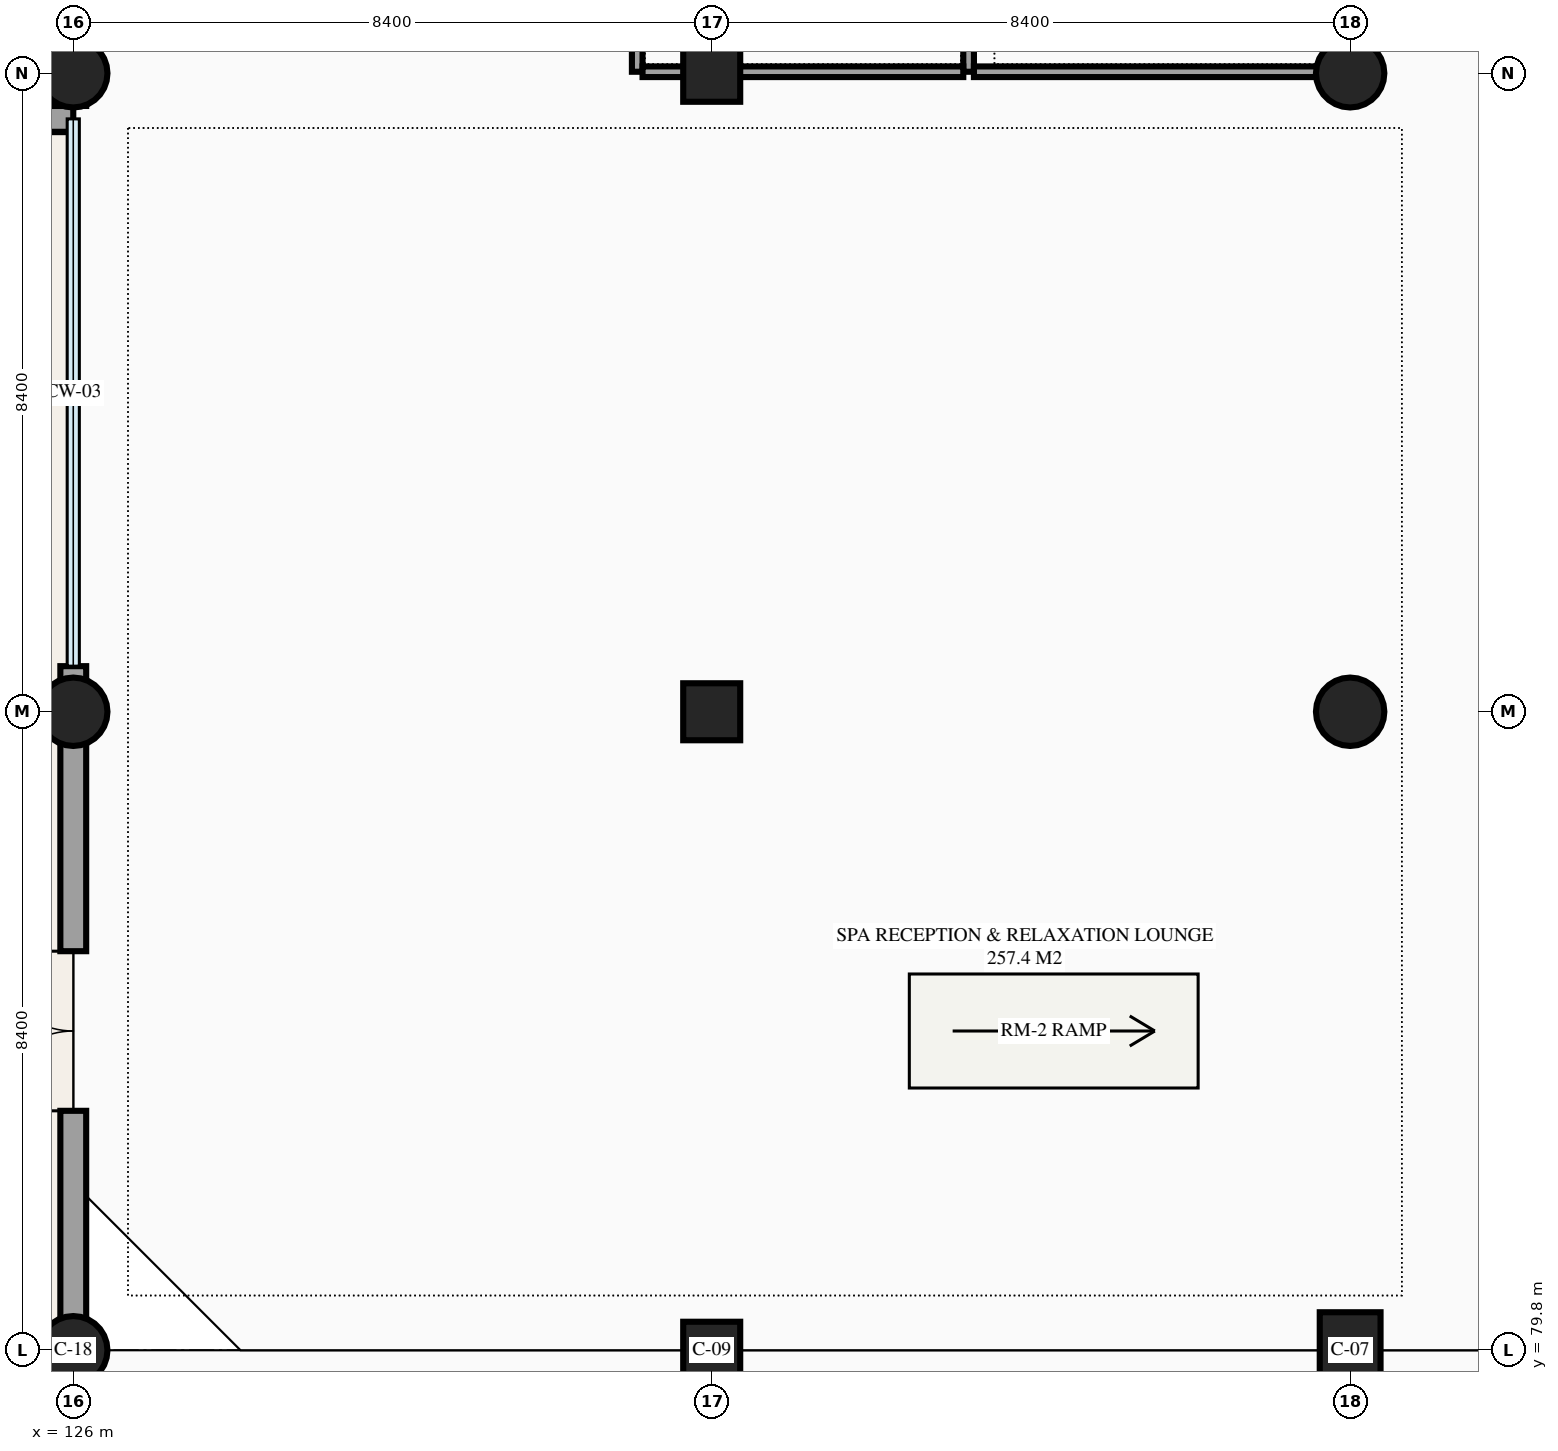
"""IFC4 building model, lengths in metres.
Left out: names, types, materials, properties, quantities, classifications, styles, units other than length and angle.
Written with IfcOpenShell. Run it as: python <this file> out.ifc"""

import sys

from ifc_helpers import new_model, si_unit, direction, frame, frame_2d, origin, origin_2d, place, context, subcontext, project, spatial, rectangle, circle, extrude, element, fill, save


model = new_model("IFC4")
c1 = context("Model", 3, precision=1e-05, world=origin(), true_north=direction((0.0, 1.0)))
c2 = subcontext(c1, "Body", "Model", "MODEL_VIEW")
j1 = project(units=[si_unit("LENGTHUNIT", "METRE"), si_unit("PLANEANGLEUNIT", "RADIAN")], contexts=[c1])
p1 = place(None, origin())
s1 = spatial("IfcSite", under=j1, at=p1, CompositionType="ELEMENT")
p2 = place(p1, origin())
s2 = spatial("IfcBuilding", under=s1, at=p2, CompositionType="ELEMENT")
p3 = place(p2, origin())
s3 = spatial("IfcBuildingStorey", under=s2, at=p3, CompositionType="ELEMENT", Elevation=0.0)
for number, where, z_axis, x_axis in (
    (1, (126.0, 79.8, 0.0), (0.0, 0.0, 1.0), (1.0, 0.0, 0.0)),
    (2, (126.0, 88.2, 0.0), (0.0, 0.0, 1.0), (1.0, 0.0, 0.0)),
    (3, (126.0, 96.6, 0.0), (0.0, 0.0, 1.0), (1.0, 0.0, 0.0)),
):
    element("IfcColumn", number, at=place(p3, frame(where, z_axis=z_axis, x_axis=x_axis)), inside=s3, PredefinedType="COLUMN", context=c2, shape_type="SweptSolid", body=[
        extrude(circle(Radius=0.45, at=origin_2d()), origin(), (0.0, 0.0, 1.0), 5.4),
    ])
for number, where, z_axis, x_axis in (
    (4, (134.4, 79.8, 0.0), (0.0, 0.0, 1.0), (1.0, 0.0, 0.0)),
    (5, (134.4, 88.2, 0.0), (0.0, 0.0, 1.0), (1.0, 0.0, 0.0)),
    (6, (134.4, 96.6, 0.0), (0.0, 0.0, 1.0), (1.0, 0.0, 0.0)),
):
    element("IfcColumn", number, at=place(p3, frame(where, z_axis=z_axis, x_axis=x_axis)), inside=s3, PredefinedType="COLUMN", context=c2, shape_type="SweptSolid", body=[
        extrude(rectangle(XDim=0.75, YDim=0.75, at=origin_2d()), origin(), (0.0, 0.0, 1.0), 5.4),
    ])
p4 = place(p3, frame((142.8, 79.8, 0.0), z_axis=(0.0, 0.0, 1.0), x_axis=(1.0, 0.0, 0.0)))
e7 = element("IfcColumn", 7, at=p4, inside=s3, PredefinedType="COLUMN", context=c2, shape_type="SweptSolid", body=[
    extrude(rectangle(XDim=0.8, YDim=1.0, at=origin_2d()), origin(), (0.0, 0.0, 1.0), 5.4),
])
for number, where, z_axis, x_axis in (
    (8, (142.8, 88.2, 0.0), (0.0, 0.0, 1.0), (1.0, 0.0, 0.0)),
    (9, (142.8, 96.6, 0.0), (0.0, 0.0, 1.0), (1.0, 0.0, 0.0)),
):
    element("IfcColumn", number, at=place(p3, frame(where, z_axis=z_axis, x_axis=x_axis)), inside=s3, PredefinedType="COLUMN", context=c2, shape_type="SweptSolid", body=[
        extrude(circle(Radius=0.45, at=origin_2d()), origin(), (0.0, 0.0, 1.0), 5.4),
    ])
p5 = place(p3, frame((126.0, 79.8, 0.0), z_axis=(0.0, 0.0, 1.0), x_axis=(0.0, -1.0, 0.0)))
e10 = element("IfcWall", 10, at=p5, inside=s3, PredefinedType="STANDARD", context=c2, shape_type="SweptSolid", body=[
    extrude(rectangle(XDim=8.4, YDim=0.34, at=frame_2d((4.2, 0.0))), origin(), (0.0, 0.0, 1.0), 4.24),
])
p6 = place(p5, frame((5.25, 0.0, 0.0), z_axis=(0.0, 0.0, 1.0), x_axis=(-1.0, 0.0, 0.0)))
e11 = element("IfcOpeningElement", 11, at=p6, cuts=e10, PredefinedType="OPENING", context=c2, shape_type="SweptSolid", body=[
    extrude(rectangle(XDim=2.1, YDim=2.4, at=frame_2d((1.05, 1.2))), frame((0.0, 0.18, 0.0), z_axis=(0.0, -1.0, 0.0), x_axis=(1.0, 0.0, 0.0)), (0.0, 0.0, 1.0), 0.36),
])
p7 = place(p3, frame((126.0, 88.2, 0.0), z_axis=(0.0, 0.0, 1.0), x_axis=(0.0, -1.0, 0.0)))
e12 = element("IfcWall", 12, at=p7, inside=s3, PredefinedType="STANDARD", context=c2, shape_type="SweptSolid", body=[
    extrude(rectangle(XDim=8.4, YDim=0.34, at=frame_2d((4.2, 0.0))), origin(), (0.0, 0.0, 1.0), 4.34),
])
p8 = place(p7, frame((5.25, 0.0, 0.0), z_axis=(0.0, 0.0, 1.0), x_axis=(-1.0, 0.0, 0.0)))
e13 = element("IfcOpeningElement", 13, at=p8, cuts=e12, PredefinedType="OPENING", context=c2, shape_type="SweptSolid", body=[
    extrude(rectangle(XDim=2.1, YDim=2.4, at=frame_2d((1.05, 1.2))), frame((0.0, 0.18, 0.0), z_axis=(0.0, -1.0, 0.0), x_axis=(1.0, 0.0, 0.0)), (0.0, 0.0, 1.0), 0.36),
])
p9 = place(p3, frame((126.0, 96.6, 0.0), z_axis=(0.0, 0.0, 1.0), x_axis=(0.0, -1.0, 0.0)))
e14 = element("IfcWall", 14, at=p9, inside=s3, PredefinedType="STANDARD", context=c2, shape_type="SweptSolid", body=[
    extrude(rectangle(XDim=0.43, YDim=0.34, at=frame_2d((0.215, 0.0))), origin(), (0.0, 0.0, 1.0), 5.4),
])
p10 = place(p3, frame((126.0, 88.8, 0.0), z_axis=(0.0, 0.0, 1.0), x_axis=(0.0, -1.0, 0.0)))
e15 = element("IfcWall", 15, at=p10, inside=s3, PredefinedType="STANDARD", context=c2, shape_type="SweptSolid", body=[
    extrude(rectangle(XDim=0.6, YDim=0.34, at=frame_2d((0.3, 0.0))), origin(), (0.0, 0.0, 1.0), 5.4),
])
p11 = place(p3, frame((126.0, 97.2, 0.0), z_axis=(0.0, 0.0, 1.0), x_axis=(0.0, -1.0, 0.0)))
e16 = element("IfcWall", 16, at=p11, inside=s3, PredefinedType="STANDARD", context=c2, shape_type="SweptSolid", body=[
    extrude(rectangle(XDim=0.6, YDim=0.34, at=frame_2d((0.3, 0.0))), origin(), (0.0, 0.0, 1.0), 5.4),
])
p12 = place(p3, frame((58.8, 96.0, 0.0), z_axis=(0.0, 0.0, 1.0), x_axis=(1.0, 0.0, 0.0)))
e17 = element("IfcWall", 17, at=p12, inside=s3, PredefinedType="STANDARD", context=c2, shape_type="SweptSolid", body=[
    extrude(rectangle(XDim=67.2, YDim=0.34, at=frame_2d((33.6, 0.0))), origin(), (0.0, 0.0, 1.0), 5.4),
])
for number, where, z_axis, x_axis in (
    (18, (133.42, 96.62, 0.0), (0.0, 0.0, 1.0), (0.0, 1.0, 0.0)),
    (19, (137.78, 96.62, 0.0), (0.0, 0.0, 1.0), (0.0, 1.0, 0.0)),
):
    element("IfcWall", number, at=place(p3, frame(where, z_axis=z_axis, x_axis=x_axis)), inside=s3, PredefinedType="PARTITIONING", context=c2, shape_type="SweptSolid", body=[
        extrude(rectangle(XDim=8.29, YDim=0.14, at=frame_2d((4.145, 0.0))), origin(), (0.0, 0.0, 1.0), 5.135),
    ])
p13 = place(p3, frame((134.4, 96.62, 0.0), z_axis=(0.0, 0.0, 1.0), x_axis=(1.0, 0.0, 0.0)))
e20 = element("IfcWall", 20, at=p13, inside=s3, PredefinedType="PARTITIONING", context=c2, shape_type="SweptSolid", body=[
    extrude(rectangle(XDim=3.31, YDim=0.14, at=frame_2d((1.655, 0.0))), origin(), (0.0, 0.0, 1.0), 4.29),
])
p14 = place(p3, frame((142.58, 96.62, 0.0), z_axis=(0.0, 0.0, 1.0), x_axis=(0.0, 1.0, 0.0)))
e21 = element("IfcWall", 21, at=p14, inside=s3, PredefinedType="PARTITIONING", context=c2, shape_type="SweptSolid", body=[
    extrude(rectangle(XDim=8.29, YDim=0.14, at=frame_2d((4.145, 0.0))), origin(), (0.0, 0.0, 1.0), 5.135),
])
p15 = place(p3, frame((137.85, 96.62, 0.0), z_axis=(0.0, 0.0, 1.0), x_axis=(1.0, 0.0, 0.0)))
e22 = element("IfcWall", 22, at=p15, inside=s3, PredefinedType="PARTITIONING", context=c2, shape_type="SweptSolid", body=[
    extrude(rectangle(XDim=4.66, YDim=0.14, at=frame_2d((2.33, 0.0))), origin(), (0.0, 0.0, 1.0), 4.29),
])
p16 = place(p3, frame((143.02, 63.0, 0.0), z_axis=(0.0, 0.0, 1.0), x_axis=(0.0, 1.0, 0.0)))
e23 = element("IfcWall", 23, at=p16, inside=s3, PredefinedType="PARTITIONING", context=c2, shape_type="SweptSolid", body=[
    extrude(rectangle(XDim=16.58, YDim=0.18, at=frame_2d((8.29, 0.0))), origin(), (0.0, 0.0, 1.0), 4.39),
])
p17 = place(p3, frame((133.49, 96.62, 0.0), z_axis=(0.0, 0.0, 1.0), x_axis=(1.0, 0.0, 0.0)))
e24 = element("IfcWall", 24, at=p17, inside=s3, PredefinedType="PARTITIONING", context=c2, shape_type="SweptSolid", body=[
    extrude(rectangle(XDim=0.91, YDim=0.14, at=frame_2d((0.455, 0.0))), origin(), (0.0, 0.0, 1.0), 4.456),
])
p18 = place(p8, origin())
e25 = element("IfcDoor", 25, at=p18, inside=s3, OperationType="DOUBLE_DOOR_SINGLE_SWING", PredefinedType="DOOR", context=c2, shape_type="SweptSolid", body=[
    extrude(rectangle(XDim=2.1, YDim=2.4, at=frame_2d((1.05, 1.2))), frame((0.0, 0.025, 0.0), z_axis=(0.0, -1.0, 0.0), x_axis=(1.0, 0.0, 0.0)), (0.0, 0.0, 1.0), 0.05),
])
fill(e13, e25)
save(model, sys.argv[1])
